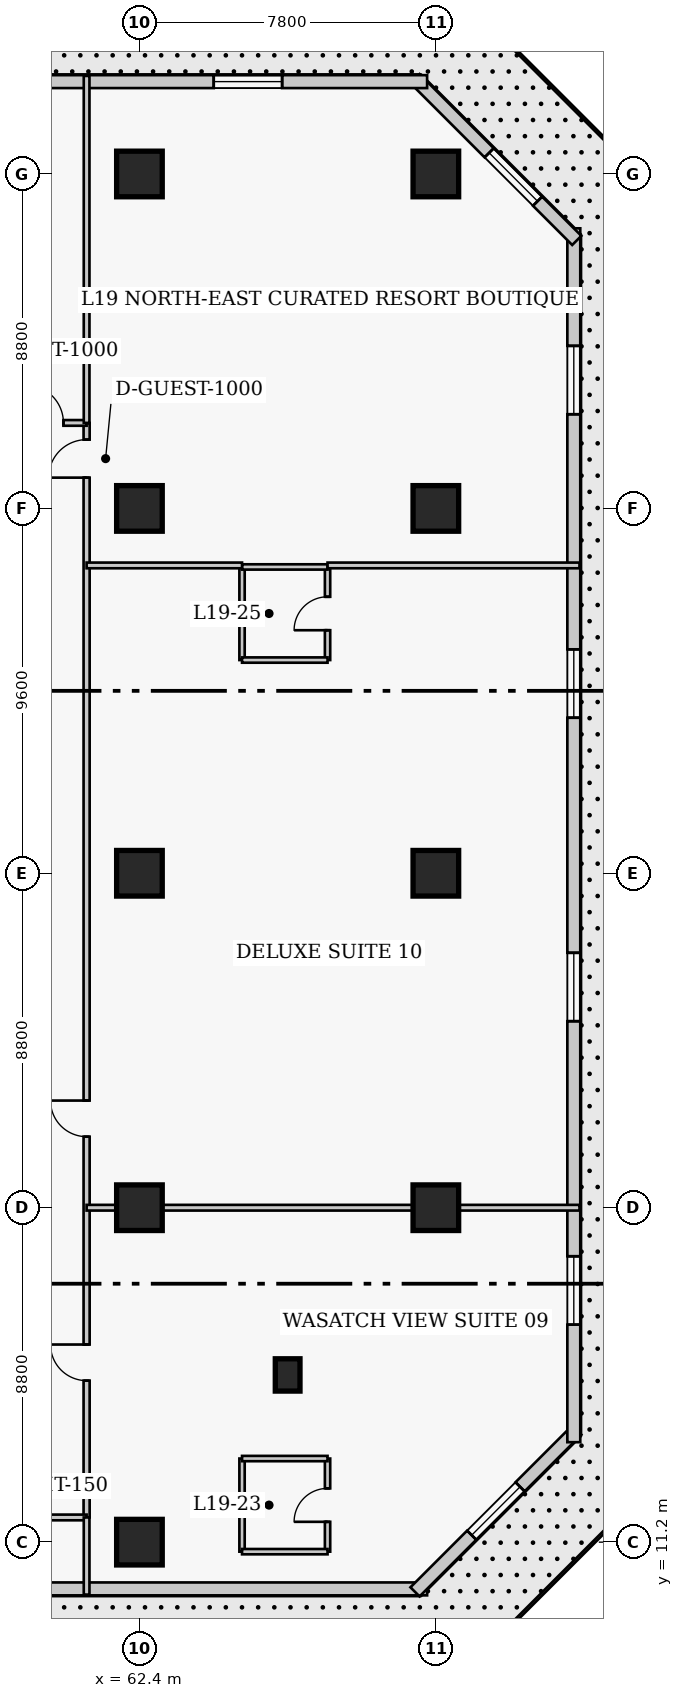
"""IFC4 building model, lengths in metres.
Left out: names, types, materials, properties, quantities, classifications, styles, units other than length and angle.
Written with IfcOpenShell. Run it as: python <this file> out.ifc"""

import sys

from ifc_helpers import new_model, si_unit, direction, frame, frame_2d, origin, origin_2d, place, context, subcontext, project, spatial, rectangle, extrude, element, fill, save


model = new_model("IFC4")
c1 = context("Model", 3, precision=1e-05, world=origin(), true_north=direction((0.0, 1.0)))
c2 = subcontext(c1, "Body", "Model", "MODEL_VIEW")
j1 = project(units=[si_unit("LENGTHUNIT", "METRE"), si_unit("PLANEANGLEUNIT", "RADIAN")], contexts=[c1])
p1 = place(None, origin())
s1 = spatial("IfcSite", under=j1, at=p1, CompositionType="ELEMENT")
p2 = place(p1, origin())
s2 = spatial("IfcBuilding", under=s1, at=p2, CompositionType="ELEMENT")
p3 = place(p2, frame((0.0, 0.0, 80.4)))
s3 = spatial("IfcBuildingStorey", under=s2, at=p3, CompositionType="ELEMENT", Elevation=80.4)
for number, where, z_axis, x_axis in (
    (1, (62.4, 11.2, 0.0), (0.0, 0.0, 1.0), (1.0, 0.0, 0.0)),
    (2, (62.4, 20.0, 0.0), (0.0, 0.0, 1.0), (1.0, 0.0, 0.0)),
    (3, (62.4, 28.8, 0.0), (0.0, 0.0, 1.0), (1.0, 0.0, 0.0)),
    (4, (62.4, 38.4, 0.0), (0.0, 0.0, 1.0), (1.0, 0.0, 0.0)),
    (5, (62.4, 47.2, 0.0), (0.0, 0.0, 1.0), (1.0, 0.0, 0.0)),
    (6, (70.2, 20.0, 0.0), (0.0, 0.0, 1.0), (1.0, 0.0, 0.0)),
    (7, (70.2, 28.8, 0.0), (0.0, 0.0, 1.0), (1.0, 0.0, 0.0)),
    (8, (70.2, 38.4, 0.0), (0.0, 0.0, 1.0), (1.0, 0.0, 0.0)),
    (9, (70.2, 47.2, 0.0), (0.0, 0.0, 1.0), (1.0, 0.0, 0.0)),
):
    element("IfcColumn", number, at=place(p3, frame(where, z_axis=z_axis, x_axis=x_axis)), inside=s3, PredefinedType="COLUMN", context=c2, shape_type="SweptSolid", body=[
        extrude(rectangle(XDim=1.2, YDim=1.2, at=origin_2d()), origin(), (0.0, 0.0, 1.0), 3.8),
    ])
p4 = place(p3, frame((66.3, 15.6, 0.0), z_axis=(0.0, 0.0, 1.0), x_axis=(1.0, 0.0, 0.0)))
e10 = element("IfcColumn", 10, at=p4, inside=s3, PredefinedType="PILASTER", context=c2, shape_type="SweptSolid", body=[
    extrude(rectangle(XDim=0.65, YDim=0.85, at=origin_2d()), origin(), (0.0, 0.0, 1.0), 3.8),
])
p5 = place(p3, frame((41.68, 9.97, 0.0), z_axis=(0.0, 0.0, 1.0), x_axis=(1.0, 0.0, 0.0)))
e11 = element("IfcWall", 11, at=p5, inside=s3, PredefinedType="SOLIDWALL", context=c2, shape_type="SweptSolid", body=[
    extrude(rectangle(XDim=28.29, YDim=0.34, at=frame_2d((14.145, 0.0))), origin(), (0.0, 0.0, 1.0), 3.54),
])
p6 = place(p5, frame((14.945, 0.0, 0.0)))
e12 = element("IfcOpeningElement", 12, at=p6, cuts=e11, PredefinedType="OPENING", context=c2, shape_type="SweptSolid", body=[
    extrude(rectangle(XDim=1.4, YDim=2.15, at=frame_2d((0.7, 1.075))), frame((0.0, 0.18, 0.0), z_axis=(0.0, -1.0, 0.0), x_axis=(1.0, 0.0, 0.0)), (0.0, 0.0, 1.0), 0.36),
])
p7 = place(p5, frame((2.665, 0.0, 0.85)))
e13 = element("IfcOpeningElement", 13, at=p7, cuts=e11, PredefinedType="OPENING", context=c2, shape_type="SweptSolid", body=[
    extrude(rectangle(XDim=1.8, YDim=1.8, at=frame_2d((0.9, 0.9))), frame((0.0, 0.18, 0.0), z_axis=(0.0, -1.0, 0.0), x_axis=(1.0, 0.0, 0.0)), (0.0, 0.0, 1.0), 0.36),
])
p8 = place(p3, frame((69.652, 9.892, 0.0), z_axis=(0.0, 0.0, 1.0), x_axis=(0.707106781187, 0.707106781187, 0.0)))
e14 = element("IfcWall", 14, at=p8, inside=s3, PredefinedType="SOLIDWALL", context=c2, shape_type="SweptSolid", body=[
    extrude(rectangle(XDim=6.02, YDim=0.34, at=frame_2d((3.01, 0.0))), origin(), (0.0, 0.0, 1.0), 3.54),
])
p9 = place(p8, frame((2.11, 0.0, 0.85)))
e15 = element("IfcOpeningElement", 15, at=p9, cuts=e14, PredefinedType="OPENING", context=c2, shape_type="SweptSolid", body=[
    extrude(rectangle(XDim=1.8, YDim=1.8, at=frame_2d((0.9, 0.9))), frame((0.0, 0.18, 0.0), z_axis=(0.0, -1.0, 0.0), x_axis=(1.0, 0.0, 0.0)), (0.0, 0.0, 1.0), 0.36),
])
p10 = place(p3, frame((73.83, 13.83, 0.0), z_axis=(0.0, 0.0, 1.0), x_axis=(0.0, 1.0, 0.0)))
e16 = element("IfcWall", 16, at=p10, inside=s3, PredefinedType="SOLIDWALL", context=c2, shape_type="SweptSolid", body=[
    extrude(rectangle(XDim=31.94, YDim=0.34, at=frame_2d((15.97, 0.0))), origin(), (0.0, 0.0, 1.0), 3.54),
])
p11 = place(p10, frame((3.093, 0.0, 0.85)))
e17 = element("IfcOpeningElement", 17, at=p11, cuts=e16, PredefinedType="OPENING", context=c2, shape_type="SweptSolid", body=[
    extrude(rectangle(XDim=1.8, YDim=1.8, at=frame_2d((0.9, 0.9))), frame((0.0, 0.18, 0.0), z_axis=(0.0, -1.0, 0.0), x_axis=(1.0, 0.0, 0.0)), (0.0, 0.0, 1.0), 0.36),
])
p12 = place(p10, frame((11.077, 0.0, 0.85)))
e18 = element("IfcOpeningElement", 18, at=p12, cuts=e16, PredefinedType="OPENING", context=c2, shape_type="SweptSolid", body=[
    extrude(rectangle(XDim=1.8, YDim=1.8, at=frame_2d((0.9, 0.9))), frame((0.0, 0.18, 0.0), z_axis=(0.0, -1.0, 0.0), x_axis=(1.0, 0.0, 0.0)), (0.0, 0.0, 1.0), 0.36),
])
p13 = place(p10, frame((19.062, 0.0, 0.85)))
e19 = element("IfcOpeningElement", 19, at=p13, cuts=e16, PredefinedType="OPENING", context=c2, shape_type="SweptSolid", body=[
    extrude(rectangle(XDim=1.8, YDim=1.8, at=frame_2d((0.9, 0.9))), frame((0.0, 0.18, 0.0), z_axis=(0.0, -1.0, 0.0), x_axis=(1.0, 0.0, 0.0)), (0.0, 0.0, 1.0), 0.36),
])
p14 = place(p10, frame((27.048, 0.0, 0.85)))
e20 = element("IfcOpeningElement", 20, at=p14, cuts=e16, PredefinedType="OPENING", context=c2, shape_type="SweptSolid", body=[
    extrude(rectangle(XDim=1.8, YDim=1.8, at=frame_2d((0.9, 0.9))), frame((0.0, 0.18, 0.0), z_axis=(0.0, -1.0, 0.0), x_axis=(1.0, 0.0, 0.0)), (0.0, 0.0, 1.0), 0.36),
])
p15 = place(p3, frame((73.908, 45.451, 0.0), z_axis=(0.0, 0.0, 1.0), x_axis=(-0.707106781187, 0.707106781187, 0.0)))
e21 = element("IfcWall", 21, at=p15, inside=s3, PredefinedType="SOLIDWALL", context=c2, shape_type="SweptSolid", body=[
    extrude(rectangle(XDim=6.02, YDim=0.34, at=frame_2d((3.01, 0.0))), origin(), (0.0, 0.0, 1.0), 3.54),
])
p16 = place(p15, frame((1.46, 0.0, 0.85)))
e22 = element("IfcOpeningElement", 22, at=p16, cuts=e21, PredefinedType="OPENING", context=c2, shape_type="SweptSolid", body=[
    extrude(rectangle(XDim=1.8, YDim=1.8, at=frame_2d((0.9, 0.9))), frame((0.0, 0.18, 0.0), z_axis=(0.0, -1.0, 0.0), x_axis=(1.0, 0.0, 0.0)), (0.0, 0.0, 1.0), 0.36),
])
p17 = place(p3, frame((69.97, 49.63, 0.0), z_axis=(0.0, 0.0, 1.0), x_axis=(-1.0, 0.0, 0.0)))
e23 = element("IfcWall", 23, at=p17, inside=s3, PredefinedType="SOLIDWALL", context=c2, shape_type="SweptSolid", body=[
    extrude(rectangle(XDim=28.29, YDim=0.34, at=frame_2d((14.145, 0.0))), origin(), (0.0, 0.0, 1.0), 3.54),
])
p18 = place(p17, frame((3.815, 0.0, 0.85)))
e24 = element("IfcOpeningElement", 24, at=p18, cuts=e23, PredefinedType="OPENING", context=c2, shape_type="SweptSolid", body=[
    extrude(rectangle(XDim=1.8, YDim=1.8, at=frame_2d((0.9, 0.9))), frame((0.0, 0.18, 0.0), z_axis=(0.0, -1.0, 0.0), x_axis=(1.0, 0.0, 0.0)), (0.0, 0.0, 1.0), 0.36),
])
p19 = place(p17, frame((13.245, 0.0, 0.85)))
e25 = element("IfcOpeningElement", 25, at=p19, cuts=e23, PredefinedType="OPENING", context=c2, shape_type="SweptSolid", body=[
    extrude(rectangle(XDim=1.8, YDim=1.8, at=frame_2d((0.9, 0.9))), frame((0.0, 0.18, 0.0), z_axis=(0.0, -1.0, 0.0), x_axis=(1.0, 0.0, 0.0)), (0.0, 0.0, 1.0), 0.36),
])
p20 = place(p17, frame((22.675, 0.0, 0.85)))
e26 = element("IfcOpeningElement", 26, at=p20, cuts=e23, PredefinedType="OPENING", context=c2, shape_type="SweptSolid", body=[
    extrude(rectangle(XDim=1.8, YDim=1.8, at=frame_2d((0.9, 0.9))), frame((0.0, 0.18, 0.0), z_axis=(0.0, -1.0, 0.0), x_axis=(1.0, 0.0, 0.0)), (0.0, 0.0, 1.0), 0.36),
])
p21 = place(p3, frame((61.01, 11.85, 0.0), z_axis=(0.0, 0.0, 1.0), x_axis=(0.0, 1.0, 0.0)))
e27 = element("IfcWall", 27, at=p21, inside=s3, PredefinedType="PARTITIONING", context=c2, shape_type="SweptSolid", body=[
    extrude(rectangle(XDim=28.8, YDim=0.16, at=frame_2d((14.4, 0.0))), origin(), (0.0, 0.0, 1.0), 3.54),
])
p22 = place(p21, frame((3.6, 0.0, 0.0)))
e28 = element("IfcOpeningElement", 28, at=p22, cuts=e27, PredefinedType="OPENING", context=c2, shape_type="SweptSolid", body=[
    extrude(rectangle(XDim=0.95, YDim=2.1, at=frame_2d((0.475, 1.05))), frame((0.0, 0.09, 0.0), z_axis=(0.0, -1.0, 0.0), x_axis=(1.0, 0.0, 0.0)), (0.0, 0.0, 1.0), 0.18),
])
p23 = place(p21, frame((10.019, 0.0, 0.0)))
e29 = element("IfcOpeningElement", 29, at=p23, cuts=e27, PredefinedType="OPENING", context=c2, shape_type="SweptSolid", body=[
    extrude(rectangle(XDim=0.95, YDim=2.1, at=frame_2d((0.475, 1.05))), frame((0.0, 0.09, 0.0), z_axis=(0.0, -1.0, 0.0), x_axis=(1.0, 0.0, 0.0)), (0.0, 0.0, 1.0), 0.18),
])
p24 = place(p21, frame((27.36, 0.0, 0.0)))
e30 = element("IfcOpeningElement", 30, at=p24, cuts=e27, PredefinedType="OPENING", context=c2, shape_type="SweptSolid", body=[
    extrude(rectangle(XDim=1.0, YDim=2.15, at=frame_2d((0.5, 1.075))), frame((0.0, 0.09, 0.0), z_axis=(0.0, -1.0, 0.0), x_axis=(1.0, 0.0, 0.0)), (0.0, 0.0, 1.0), 0.18),
])
p25 = place(p3, frame((58.79, 11.85, 0.0), z_axis=(0.0, 0.0, 1.0), x_axis=(1.0, 0.0, 0.0)))
e31 = element("IfcWall", 31, at=p25, inside=s3, PredefinedType="PARTITIONING", context=c2, shape_type="SweptSolid", body=[
    extrude(rectangle(XDim=2.22, YDim=0.15, at=frame_2d((1.11, 0.0))), origin(), (0.0, 0.0, 1.0), 3.54),
])
p26 = place(p3, frame((56.8, 40.65, 0.0), z_axis=(0.0, 0.0, 1.0), x_axis=(1.0, 0.0, 0.0)))
e32 = element("IfcWall", 32, at=p26, inside=s3, PredefinedType="PARTITIONING", context=c2, shape_type="SweptSolid", body=[
    extrude(rectangle(XDim=4.21, YDim=0.15, at=frame_2d((2.105, 0.0))), origin(), (0.0, 0.0, 1.0), 3.54),
])
p27 = place(p26, frame((2.6, 0.0, 0.0)))
e33 = element("IfcOpeningElement", 33, at=p27, cuts=e32, PredefinedType="OPENING", context=c2, shape_type="SweptSolid", body=[
    extrude(rectangle(XDim=1.0, YDim=2.15, at=frame_2d((0.5, 1.075))), frame((0.0, 0.085, 0.0), z_axis=(0.0, -1.0, 0.0), x_axis=(1.0, 0.0, 0.0)), (0.0, 0.0, 1.0), 0.17),
])
p28 = place(p3, frame((61.01, 40.65, 0.0), z_axis=(0.0, 0.0, 1.0), x_axis=(0.0, 1.0, 0.0)))
e34 = element("IfcWall", 34, at=p28, inside=s3, PredefinedType="PARTITIONING", context=c2, shape_type="SweptSolid", body=[
    extrude(rectangle(XDim=9.13, YDim=0.15, at=frame_2d((4.565, 0.0))), origin(), (0.0, 0.0, 1.0), 3.54),
])
p29 = place(p3, frame((61.01, 9.82, 0.0), z_axis=(0.0, 0.0, 1.0), x_axis=(0.0, 1.0, 0.0)))
e35 = element("IfcWall", 35, at=p29, inside=s3, PredefinedType="PARTITIONING", context=c2, shape_type="SweptSolid", body=[
    extrude(rectangle(XDim=2.03, YDim=0.15, at=frame_2d((1.015, 0.0))), origin(), (0.0, 0.0, 1.0), 3.54),
])
p30 = place(p3, frame((65.1, 10.95, 0.0), z_axis=(0.0, 0.0, 1.0), x_axis=(0.0, 1.0, 0.0)))
e36 = element("IfcWall", 36, at=p30, inside=s3, PredefinedType="PLUMBINGWALL", context=c2, shape_type="SweptSolid", body=[
    extrude(rectangle(XDim=2.45, YDim=0.14, at=frame_2d((1.225, 0.0))), origin(), (0.0, 0.0, 1.0), 3.54),
])
p31 = place(p3, frame((67.35, 10.95, 0.0), z_axis=(0.0, 0.0, 1.0), x_axis=(0.0, 1.0, 0.0)))
e37 = element("IfcWall", 37, at=p31, inside=s3, PredefinedType="PLUMBINGWALL", context=c2, shape_type="SweptSolid", body=[
    extrude(rectangle(XDim=2.45, YDim=0.14, at=frame_2d((1.225, 0.0))), origin(), (0.0, 0.0, 1.0), 3.54),
])
p32 = place(p31, frame((0.785, 0.0, 0.0)))
e38 = element("IfcOpeningElement", 38, at=p32, cuts=e37, PredefinedType="OPENING", context=c2, shape_type="SweptSolid", body=[
    extrude(rectangle(XDim=0.88, YDim=2.05, at=frame_2d((0.44, 1.025))), frame((0.0, 0.08, 0.0), z_axis=(0.0, -1.0, 0.0), x_axis=(1.0, 0.0, 0.0)), (0.0, 0.0, 1.0), 0.16),
])
for number, where, z_axis, x_axis in (
    (39, (65.1, 10.95, 0.0), (0.0, 0.0, 1.0), (1.0, 0.0, 0.0)),
    (40, (65.1, 13.4, 0.0), (0.0, 0.0, 1.0), (1.0, 0.0, 0.0)),
):
    element("IfcWall", number, at=place(p3, frame(where, z_axis=z_axis, x_axis=x_axis)), inside=s3, PredefinedType="PLUMBINGWALL", context=c2, shape_type="SweptSolid", body=[
        extrude(rectangle(XDim=2.25, YDim=0.14, at=frame_2d((1.125, 0.0))), origin(), (0.0, 0.0, 1.0), 3.54),
    ])
p33 = place(p3, frame((61.01, 20.0, 0.0), z_axis=(0.0, 0.0, 1.0), x_axis=(1.0, 0.0, 0.0)))
e41 = element("IfcWall", 41, at=p33, inside=s3, PredefinedType="PARTITIONING", context=c2, shape_type="SweptSolid", body=[
    extrude(rectangle(XDim=12.97, YDim=0.15, at=frame_2d((6.485, 0.0))), origin(), (0.0, 0.0, 1.0), 2.679),
])
p34 = place(p3, frame((65.1, 34.41, 0.0), z_axis=(0.0, 0.0, 1.0), x_axis=(0.0, 1.0, 0.0)))
e42 = element("IfcWall", 42, at=p34, inside=s3, PredefinedType="PLUMBINGWALL", context=c2, shape_type="SweptSolid", body=[
    extrude(rectangle(XDim=2.45, YDim=0.14, at=frame_2d((1.225, 0.0))), origin(), (0.0, 0.0, 1.0), 3.54),
])
p35 = place(p3, frame((67.35, 34.41, 0.0), z_axis=(0.0, 0.0, 1.0), x_axis=(0.0, 1.0, 0.0)))
e43 = element("IfcWall", 43, at=p35, inside=s3, PredefinedType="PLUMBINGWALL", context=c2, shape_type="SweptSolid", body=[
    extrude(rectangle(XDim=2.45, YDim=0.14, at=frame_2d((1.225, 0.0))), origin(), (0.0, 0.0, 1.0), 3.54),
])
p36 = place(p35, frame((0.785, 0.0, 0.0)))
e44 = element("IfcOpeningElement", 44, at=p36, cuts=e43, PredefinedType="OPENING", context=c2, shape_type="SweptSolid", body=[
    extrude(rectangle(XDim=0.88, YDim=2.05, at=frame_2d((0.44, 1.025))), frame((0.0, 0.08, 0.0), z_axis=(0.0, -1.0, 0.0), x_axis=(1.0, 0.0, 0.0)), (0.0, 0.0, 1.0), 0.16),
])
for number, where, z_axis, x_axis in (
    (45, (65.1, 34.41, 0.0), (0.0, 0.0, 1.0), (1.0, 0.0, 0.0)),
    (46, (65.1, 36.86, 0.0), (0.0, 0.0, 1.0), (1.0, 0.0, 0.0)),
):
    element("IfcWall", number, at=place(p3, frame(where, z_axis=z_axis, x_axis=x_axis)), inside=s3, PredefinedType="PLUMBINGWALL", context=c2, shape_type="SweptSolid", body=[
        extrude(rectangle(XDim=2.25, YDim=0.14, at=frame_2d((1.125, 0.0))), origin(), (0.0, 0.0, 1.0), 3.54),
    ])
p37 = place(p3, frame((61.01, 36.9, 0.0), z_axis=(0.0, 0.0, 1.0), x_axis=(1.0, 0.0, 0.0)))
e47 = element("IfcWall", 47, at=p37, inside=s3, PredefinedType="PARTITIONING", context=c2, shape_type="SweptSolid", body=[
    extrude(rectangle(XDim=4.09, YDim=0.15, at=frame_2d((2.045, 0.0))), origin(), (0.0, 0.0, 1.0), 3.54),
])
p38 = place(p3, frame((67.35, 36.9, 0.0), z_axis=(0.0, 0.0, 1.0), x_axis=(1.0, 0.0, 0.0)))
e48 = element("IfcWall", 48, at=p38, inside=s3, PredefinedType="PARTITIONING", context=c2, shape_type="SweptSolid", body=[
    extrude(rectangle(XDim=6.63, YDim=0.15, at=frame_2d((3.315, 0.0))), origin(), (0.0, 0.0, 1.0), 3.54),
])
p39 = place(p9, origin())
e49 = element("IfcWindow", 49, at=p39, inside=s3, PartitioningType="SINGLE_PANEL", PredefinedType="WINDOW", context=c2, shape_type="SweptSolid", body=[
    extrude(rectangle(XDim=1.8, YDim=1.8, at=frame_2d((0.9, 0.9))), frame((0.0, 0.03, 0.0), z_axis=(0.0, -1.0, 0.0), x_axis=(1.0, 0.0, 0.0)), (0.0, 0.0, 1.0), 0.06),
])
fill(e15, e49)
p40 = place(p11, origin())
e50 = element("IfcWindow", 50, at=p40, inside=s3, PartitioningType="SINGLE_PANEL", PredefinedType="WINDOW", context=c2, shape_type="SweptSolid", body=[
    extrude(rectangle(XDim=1.8, YDim=1.8, at=frame_2d((0.9, 0.9))), frame((0.0, 0.03, 0.0), z_axis=(0.0, -1.0, 0.0), x_axis=(1.0, 0.0, 0.0)), (0.0, 0.0, 1.0), 0.06),
])
fill(e17, e50)
p41 = place(p12, origin())
e51 = element("IfcWindow", 51, at=p41, inside=s3, PartitioningType="SINGLE_PANEL", PredefinedType="WINDOW", context=c2, shape_type="SweptSolid", body=[
    extrude(rectangle(XDim=1.8, YDim=1.8, at=frame_2d((0.9, 0.9))), frame((0.0, 0.03, 0.0), z_axis=(0.0, -1.0, 0.0), x_axis=(1.0, 0.0, 0.0)), (0.0, 0.0, 1.0), 0.06),
])
fill(e18, e51)
p42 = place(p13, origin())
e52 = element("IfcWindow", 52, at=p42, inside=s3, PartitioningType="SINGLE_PANEL", PredefinedType="WINDOW", context=c2, shape_type="SweptSolid", body=[
    extrude(rectangle(XDim=1.8, YDim=1.8, at=frame_2d((0.9, 0.9))), frame((0.0, 0.03, 0.0), z_axis=(0.0, -1.0, 0.0), x_axis=(1.0, 0.0, 0.0)), (0.0, 0.0, 1.0), 0.06),
])
fill(e19, e52)
p43 = place(p14, origin())
e53 = element("IfcWindow", 53, at=p43, inside=s3, PartitioningType="SINGLE_PANEL", PredefinedType="WINDOW", context=c2, shape_type="SweptSolid", body=[
    extrude(rectangle(XDim=1.8, YDim=1.8, at=frame_2d((0.9, 0.9))), frame((0.0, 0.03, 0.0), z_axis=(0.0, -1.0, 0.0), x_axis=(1.0, 0.0, 0.0)), (0.0, 0.0, 1.0), 0.06),
])
fill(e20, e53)
p44 = place(p16, origin())
e54 = element("IfcWindow", 54, at=p44, inside=s3, PartitioningType="SINGLE_PANEL", PredefinedType="WINDOW", context=c2, shape_type="SweptSolid", body=[
    extrude(rectangle(XDim=1.8, YDim=1.8, at=frame_2d((0.9, 0.9))), frame((0.0, 0.03, 0.0), z_axis=(0.0, -1.0, 0.0), x_axis=(1.0, 0.0, 0.0)), (0.0, 0.0, 1.0), 0.06),
])
fill(e22, e54)
p45 = place(p18, origin())
e55 = element("IfcWindow", 55, at=p45, inside=s3, PartitioningType="SINGLE_PANEL", PredefinedType="WINDOW", context=c2, shape_type="SweptSolid", body=[
    extrude(rectangle(XDim=1.8, YDim=1.8, at=frame_2d((0.9, 0.9))), frame((0.0, 0.03, 0.0), z_axis=(0.0, -1.0, 0.0), x_axis=(1.0, 0.0, 0.0)), (0.0, 0.0, 1.0), 0.06),
])
fill(e24, e55)
p46 = place(p27, origin())
e56 = element("IfcDoor", 56, at=p46, inside=s3, OperationType="SINGLE_SWING_LEFT", PredefinedType="DOOR", context=c2, shape_type="SweptSolid", body=[
    extrude(rectangle(XDim=1.0, YDim=2.15, at=frame_2d((0.5, 1.075))), frame((0.0, 0.025, 0.0), z_axis=(0.0, -1.0, 0.0), x_axis=(1.0, 0.0, 0.0)), (0.0, 0.0, 1.0), 0.05),
])
fill(e33, e56)
p47 = place(p32, origin())
e57 = element("IfcDoor", 57, at=p47, inside=s3, OperationType="SINGLE_SWING_LEFT", PredefinedType="DOOR", context=c2, shape_type="SweptSolid", body=[
    extrude(rectangle(XDim=0.88, YDim=2.05, at=frame_2d((0.44, 1.025))), frame((0.0, 0.025, 0.0), z_axis=(0.0, -1.0, 0.0), x_axis=(1.0, 0.0, 0.0)), (0.0, 0.0, 1.0), 0.05),
])
fill(e38, e57)
p48 = place(p22, origin())
e58 = element("IfcDoor", 58, at=p48, inside=s3, OperationType="SINGLE_SWING_RIGHT", PredefinedType="DOOR", context=c2, shape_type="SweptSolid", body=[
    extrude(rectangle(XDim=0.95, YDim=2.1, at=frame_2d((0.475, 1.05))), frame((0.0, 0.025, 0.0), z_axis=(0.0, -1.0, 0.0), x_axis=(1.0, 0.0, 0.0)), (0.0, 0.0, 1.0), 0.05),
])
fill(e28, e58)
p49 = place(p36, origin())
e59 = element("IfcDoor", 59, at=p49, inside=s3, OperationType="SINGLE_SWING_LEFT", PredefinedType="DOOR", context=c2, shape_type="SweptSolid", body=[
    extrude(rectangle(XDim=0.88, YDim=2.05, at=frame_2d((0.44, 1.025))), frame((0.0, 0.025, 0.0), z_axis=(0.0, -1.0, 0.0), x_axis=(1.0, 0.0, 0.0)), (0.0, 0.0, 1.0), 0.05),
])
fill(e44, e59)
p50 = place(p23, origin())
e60 = element("IfcDoor", 60, at=p50, inside=s3, OperationType="SINGLE_SWING_RIGHT", PredefinedType="DOOR", context=c2, shape_type="SweptSolid", body=[
    extrude(rectangle(XDim=0.95, YDim=2.1, at=frame_2d((0.475, 1.05))), frame((0.0, 0.025, 0.0), z_axis=(0.0, -1.0, 0.0), x_axis=(1.0, 0.0, 0.0)), (0.0, 0.0, 1.0), 0.05),
])
fill(e29, e60)
p51 = place(p24, origin())
e61 = element("IfcDoor", 61, at=p51, inside=s3, OperationType="SINGLE_SWING_LEFT", PredefinedType="DOOR", context=c2, shape_type="SweptSolid", body=[
    extrude(rectangle(XDim=1.0, YDim=2.15, at=frame_2d((0.5, 1.075))), frame((0.0, 0.025, 0.0), z_axis=(0.0, -1.0, 0.0), x_axis=(1.0, 0.0, 0.0)), (0.0, 0.0, 1.0), 0.05),
])
fill(e30, e61)
save(model, sys.argv[1])
